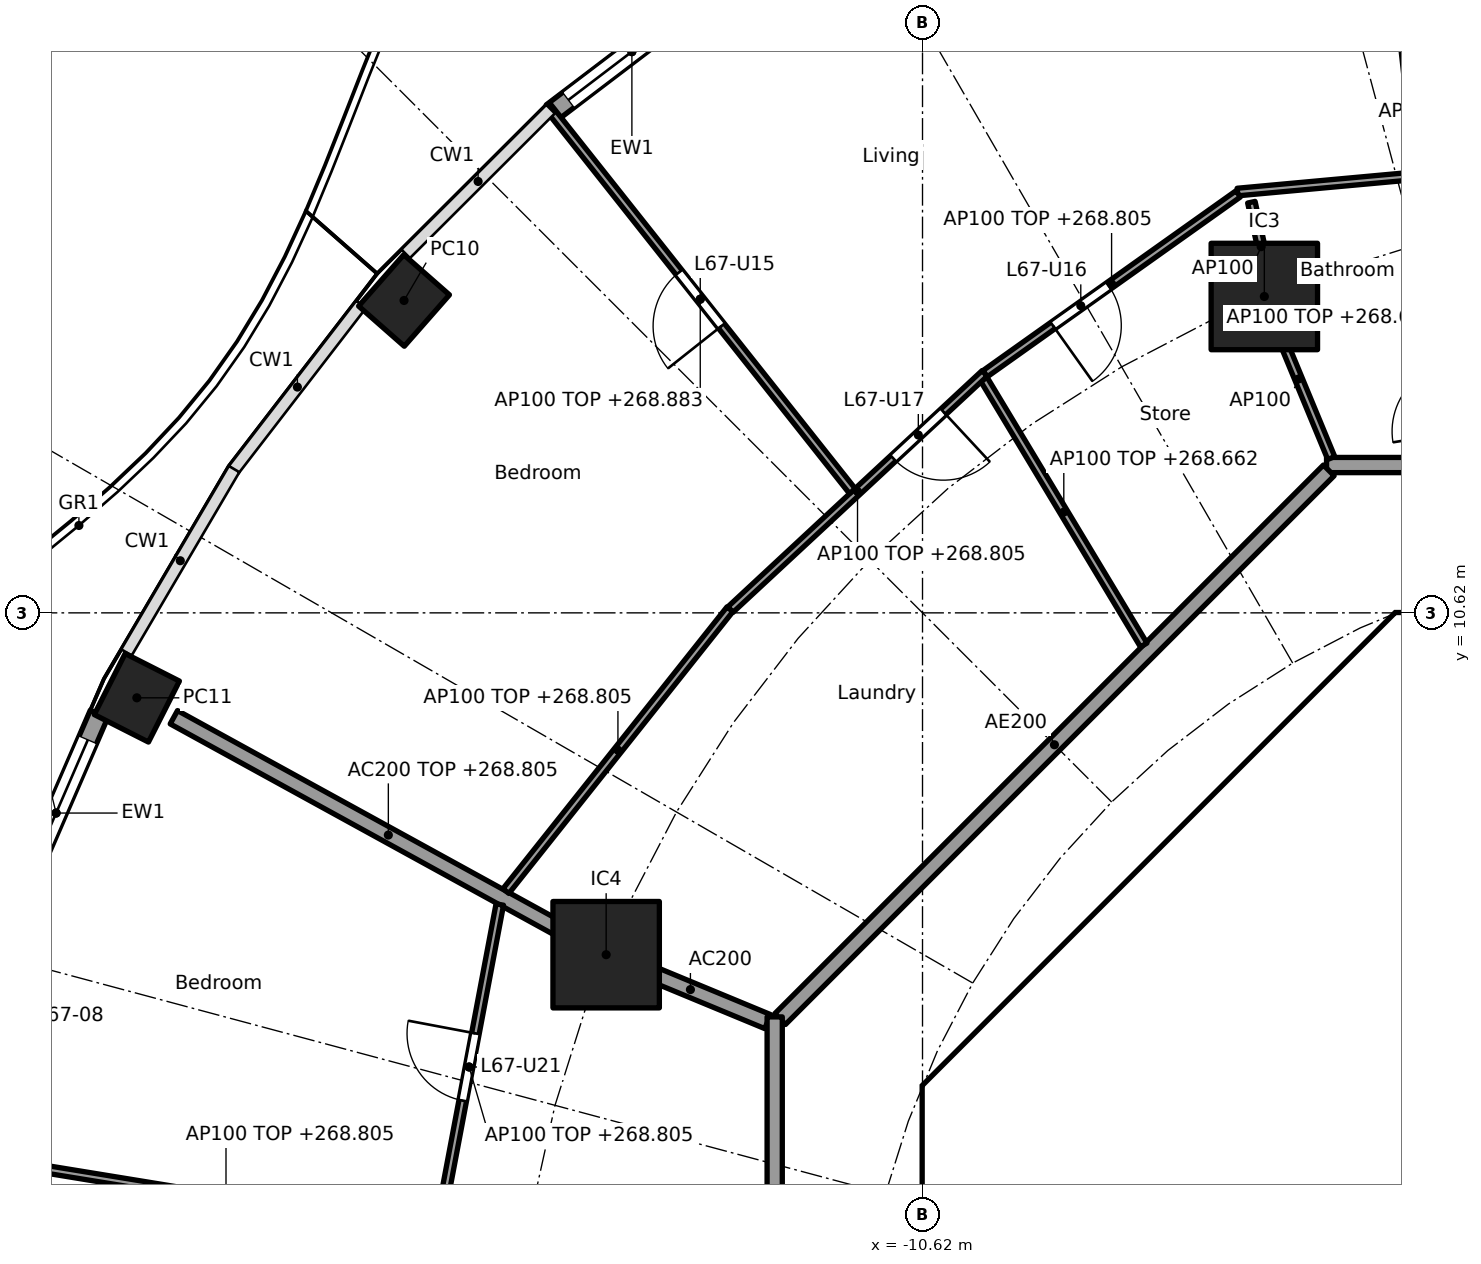
"""IFC4 building model, lengths in metres.
Left out: names, types, materials, properties, quantities, classifications, styles, units other than length and angle.
Written with IfcOpenShell. Run it as: python <this file> out.ifc"""

import sys

from ifc_helpers import new_model, si_unit, direction, frame, frame_2d, origin, origin_2d, place, context, subcontext, project, spatial, polyline, rectangle, hollow_rectangle, outline, extrude, element, fill, save


model = new_model("IFC4")
c1 = context("Model", 3, precision=1e-05, world=origin(), true_north=direction((0.0, 1.0)))
c2 = subcontext(c1, "Body", "Model", "MODEL_VIEW")
j1 = project(units=[si_unit("LENGTHUNIT", "METRE"), si_unit("PLANEANGLEUNIT", "RADIAN")], contexts=[c1])
p1 = place(None, origin())
s1 = spatial("IfcSite", under=j1, at=p1, CompositionType="ELEMENT")
p2 = place(p1, origin())
s2 = spatial("IfcBuilding", under=s1, at=p2, CompositionType="ELEMENT")
p3 = place(p2, frame((0.0, 0.0, 265.9)))
s3 = spatial("IfcBuildingStorey", under=s2, at=p3, CompositionType="ELEMENT", Elevation=265.9)
for number, where, z_axis, x_axis in (
    (1, (-17.441, 14.73, 0.0), (0.0, 0.0, 1.0), (-0.66, -0.751, 0.0)),
    (2, (-20.957, 9.502, 0.0), (0.0, 0.0, 1.0), (-0.452, -0.892, 0.0)),
):
    element("IfcColumn", number, at=place(p3, frame(where, z_axis=z_axis, x_axis=x_axis)), inside=s3, PredefinedType="COLUMN", context=c2, shape_type="SweptSolid", body=[
        extrude(hollow_rectangle(XDim=0.9, YDim=0.8, WallThickness=0.028, at=origin_2d()), origin(), (0.0, 0.0, 1.0), 3.7),
    ])
for number, where, z_axis, x_axis in (
    (3, (-6.123, 14.782, 0.0), (0.0, 0.0, 1.0), (1.0, 0.0, 0.0)),
    (4, (-14.782, 6.123, 0.0), (0.0, 0.0, 1.0), (1.0, 0.0, 0.0)),
):
    element("IfcColumn", number, at=place(p3, frame(where, z_axis=z_axis, x_axis=x_axis)), inside=s3, PredefinedType="COLUMN", context=c2, shape_type="SweptSolid", body=[
        extrude(rectangle(XDim=1.4, YDim=1.4, at=origin_2d()), origin(), (0.0, 0.0, 1.0), 3.7),
    ])
p4 = place(p3, frame((-15.495, 17.204, 0.0), z_axis=(0.0, 0.0, 1.0), x_axis=(0.796010739377, 0.605282498339, 0.0)))
e5 = element("IfcWall", 5, at=p4, inside=s3, PredefinedType="SOLIDWALL", context=c2, shape_type="SweptSolid", body=[
    extrude(rectangle(XDim=2.641, YDim=0.25, at=frame_2d((1.32, 0.0))), origin(), (0.0, 0.0, 1.0), 3.44),
])
p5 = place(p4, frame((0.27, 0.0, 0.0)))
e6 = element("IfcOpeningElement", 6, at=p5, cuts=e5, PredefinedType="OPENING", context=c2, shape_type="SweptSolid", body=[
    extrude(rectangle(XDim=2.1, YDim=2.4, at=frame_2d((1.05, 1.2))), frame((0.0, 0.135, 0.0), z_axis=(0.0, -1.0, 0.0), x_axis=(1.0, 0.0, 0.0)), (0.0, 0.0, 1.0), 0.27),
])
p6 = place(p3, frame((-22.583, 6.683, 0.0), z_axis=(0.0, 0.0, 1.0), x_axis=(0.397597791596, 0.9175598052, 0.0)))
e7 = element("IfcWall", 7, at=p6, inside=s3, PredefinedType="SOLIDWALL", context=c2, shape_type="SweptSolid", body=[
    extrude(rectangle(XDim=2.841, YDim=0.25, at=frame_2d((1.42, 0.0))), origin(), (0.0, 0.0, 1.0), 3.44),
])
p7 = place(p6, frame((0.371, 0.0, 0.0)))
e8 = element("IfcOpeningElement", 8, at=p7, cuts=e7, PredefinedType="OPENING", context=c2, shape_type="SweptSolid", body=[
    extrude(rectangle(XDim=2.1, YDim=2.4, at=frame_2d((1.05, 1.2))), frame((0.0, 0.135, 0.0), z_axis=(0.0, -1.0, 0.0), x_axis=(1.0, 0.0, 0.0)), (0.0, 0.0, 1.0), 0.27),
])
p8 = place(p3, frame((-4.613, 9.988, 0.0), z_axis=(0.0, 0.0, 1.0), x_axis=(-0.707106781187, -0.707106781187, 0.0)))
e9 = element("IfcWall", 9, at=p8, inside=s3, PredefinedType="SHEAR", context=c2, shape_type="SweptSolid", body=[
    extrude(rectangle(XDim=7.602, YDim=0.6, at=frame_2d((3.801, 0.0))), origin(), (0.0, 0.0, 1.0), 3.44),
])
p9 = place(p8, frame((0.351, 0.0, 0.0)))
e10 = element("IfcOpeningElement", 10, at=p9, cuts=e9, PredefinedType="OPENING", context=c2, shape_type="SweptSolid", body=[
    extrude(rectangle(XDim=1.1, YDim=2.1, at=frame_2d((0.55, 1.05))), frame((0.0, 0.31, 0.0), z_axis=(0.0, -1.0, 0.0), x_axis=(1.0, 0.0, 0.0)), (0.0, 0.0, 1.0), 0.62),
])
p10 = place(p3, frame((-10.325, 3.801, 0.0), z_axis=(0.0, 0.0, 1.0), x_axis=(0.0, -1.0, 0.0)))
e11 = element("IfcWall", 11, at=p10, inside=s3, PredefinedType="SHEAR", context=c2, shape_type="SweptSolid", body=[
    extrude(rectangle(XDim=7.602, YDim=0.6, at=frame_2d((3.801, 0.0))), origin(), (0.0, 0.0, 1.0), 3.44),
])
p11 = place(p10, frame((0.651, 0.0, 0.0)))
e12 = element("IfcOpeningElement", 12, at=p11, cuts=e11, PredefinedType="OPENING", context=c2, shape_type="SweptSolid", body=[
    extrude(rectangle(XDim=1.5, YDim=2.1, at=frame_2d((0.75, 1.05))), frame((0.0, 0.31, 0.0), z_axis=(0.0, -1.0, 0.0), x_axis=(1.0, 0.0, 0.0)), (0.0, 0.0, 1.0), 0.62),
])
p12 = place(p10, frame((5.451, 0.0, 0.0)))
e13 = element("IfcOpeningElement", 13, at=p12, cuts=e11, PredefinedType="OPENING", context=c2, shape_type="SweptSolid", body=[
    extrude(rectangle(XDim=1.5, YDim=2.1, at=frame_2d((0.75, 1.05))), frame((0.0, 0.31, 0.0), z_axis=(0.0, -1.0, 0.0), x_axis=(1.0, 0.0, 0.0)), (0.0, 0.0, 1.0), 0.62),
])
p13 = place(p3, frame((-5.8, 4.3, 0.0), z_axis=(0.0, 0.0, 1.0), x_axis=(0.0, 1.0, 0.0)))
e14 = element("IfcWall", 14, at=p13, inside=s3, PredefinedType="PARTITIONING", context=c2, shape_type="SweptSolid", body=[
    extrude(rectangle(XDim=3.927, YDim=0.15, at=frame_2d((1.963, 0.0))), origin(), (0.0, 0.0, 1.0), 3.44),
])
p14 = place(p13, frame((0.262, 0.0, 0.0)))
e15 = element("IfcOpeningElement", 15, at=p14, cuts=e14, PredefinedType="OPENING", context=c2, shape_type="SweptSolid", body=[
    extrude(rectangle(XDim=0.9, YDim=2.1, at=frame_2d((0.45, 1.05))), frame((0.0, 0.085, 0.0), z_axis=(0.0, -1.0, 0.0), x_axis=(1.0, 0.0, 0.0)), (0.0, 0.0, 1.0), 0.17),
])
p15 = place(p13, frame((2.338, 0.0, 0.0)))
e16 = element("IfcOpeningElement", 16, at=p15, cuts=e14, PredefinedType="OPENING", context=c2, shape_type="SweptSolid", body=[
    extrude(rectangle(XDim=0.9, YDim=2.1, at=frame_2d((0.45, 1.05))), frame((0.0, 0.085, 0.0), z_axis=(0.0, -1.0, 0.0), x_axis=(1.0, 0.0, 0.0)), (0.0, 0.0, 1.0), 0.17),
])
p16 = place(p3, origin())
e17 = element("IfcWall", 17, at=p16, inside=s3, PredefinedType="SHEAR", context=c2, shape_type="SweptSolid", body=[
    extrude(outline(polyline([(-10.2, 4.825), (-9.776, 4.401), (-10.025, 4.152), (-10.025, 3.801), (-10.625, 3.801), (-10.625, 4.401), (-10.2, 4.825)])), origin(), (0.0, 0.0, 1.0), 3.44),
])
p17 = place(p3, origin())
e18 = element("IfcWall", 18, at=p17, inside=s3, PredefinedType="SHEAR", context=c2, shape_type="SweptSolid", body=[
    extrude(outline(polyline([(-4.152, 10.025), (-4.401, 9.776), (-4.825, 10.2), (-4.401, 10.625), (4.401, 10.625), (4.825, 10.2), (4.401, 9.776), (4.152, 10.025), (-4.152, 10.025)])), origin(), (0.0, 0.0, 1.0), 3.44),
])
p18 = place(p3, frame((-10.025, 4.0, 0.0), z_axis=(0.0, 0.0, 1.0), x_axis=(1.0, 0.0, 0.0)))
e19 = element("IfcWall", 19, at=p18, inside=s3, PredefinedType="PARTITIONING", context=c2, shape_type="SweptSolid", body=[
    extrude(rectangle(XDim=3.325, YDim=0.2, at=frame_2d((1.662, 0.0))), origin(), (0.0, 0.0, 1.0), 3.44),
])
p19 = place(p3, frame((-8.301, 5.8, 0.0), z_axis=(0.0, 0.0, 1.0), x_axis=(1.0, 0.0, 0.0)))
e20 = element("IfcWall", 20, at=p19, inside=s3, PredefinedType="PARTITIONING", context=c2, shape_type="SweptSolid", body=[
    extrude(rectangle(XDim=2.426, YDim=0.15, at=frame_2d((1.213, 0.0))), origin(), (0.0, 0.0, 1.0), 3.44),
])
p20 = place(p3, origin())
e21 = element("IfcWall", 21, at=p20, inside=s3, PredefinedType="SOLIDWALL", context=c2, shape_type="SweptSolid", body=[
    extrude(outline(polyline([(-6.7, 4.3), (6.7, 4.3), (6.7, 2.1), (6.5, 2.1), (6.5, 4.1), (4.5, 4.1), (4.5, 2.1), (4.3, 2.1), (4.3, 4.1), (2.3, 4.1), (2.3, 2.1), (2.1, 2.1), (2.1, 4.1), (0.1, 4.1), (0.1, 2.1), (-0.1, 2.1), (-0.1, 4.1), (-4.3, 4.1), (-4.3, 2.1), (-4.5, 2.1), (-4.5, 4.1), (-6.5, 4.1), (-6.5, 2.1), (-6.7, 2.1), (-6.7, 4.3)])), origin(), (0.0, 0.0, 1.0), 3.44),
])
p21 = place(p3, frame((-12.657, 5.243, 0.0), z_axis=(0.0, 0.0, 1.0), x_axis=(-0.923869415315, 0.382707856524, 0.0)))
e22 = element("IfcWall", 22, at=p21, inside=s3, PredefinedType="PARTITIONING", context=c2, shape_type="SweptSolid", body=[
    extrude(rectangle(XDim=2.2, YDim=0.2, at=frame_2d((1.1, 0.0))), origin(), (0.0, 0.0, 1.0), 3.44),
])
p22 = place(p3, frame((-14.826, 6.147, 0.0), z_axis=(0.0, 0.0, 1.0), x_axis=(-0.876484755865, 0.481429613481, 0.0)))
e23 = element("IfcWall", 23, at=p22, inside=s3, PredefinedType="PARTITIONING", context=c2, shape_type="SweptSolid", body=[
    extrude(rectangle(XDim=6.439, YDim=0.2, at=frame_2d((3.219, 0.0))), origin(), (0.0, 0.0, 1.0), 2.905),
])
p23 = place(p3, frame((5.104, 12.565, 0.0), z_axis=(0.0, 0.0, 1.0), x_axis=(-1.0, 0.0, 0.0)))
e24 = element("IfcWall", 24, at=p23, inside=s3, PredefinedType="PARTITIONING", context=c2, shape_type="SweptSolid", body=[
    extrude(rectangle(XDim=10.409, YDim=0.2, at=frame_2d((5.205, 0.0))), origin(), (0.0, 0.0, 1.0), 3.44),
])
p24 = place(p23, frame((6.339, 0.0, 0.0)))
e25 = element("IfcOpeningElement", 25, at=p24, cuts=e24, PredefinedType="OPENING", context=c2, shape_type="SweptSolid", body=[
    extrude(rectangle(XDim=1.0, YDim=2.1, at=frame_2d((0.5, 1.05))), frame((0.0, 0.11, 0.0), z_axis=(0.0, -1.0, 0.0), x_axis=(1.0, 0.0, 0.0)), (0.0, 0.0, 1.0), 0.22),
])
p25 = place(p3, frame((-5.275, 12.494, 0.0), z_axis=(0.0, 0.0, 1.0), x_axis=(-0.707106781187, -0.707106781187, 0.0)))
e26 = element("IfcWall", 26, at=p25, inside=s3, PredefinedType="PARTITIONING", context=c2, shape_type="SweptSolid", body=[
    extrude(rectangle(XDim=10.209, YDim=0.2, at=frame_2d((5.104, 0.0))), origin(), (0.0, 0.0, 1.0), 3.44),
])
p26 = place(p3, frame((-12.565, 5.304, 0.0), z_axis=(0.0, 0.0, 1.0), x_axis=(0.0, -1.0, 0.0)))
e27 = element("IfcWall", 27, at=p26, inside=s3, PredefinedType="PARTITIONING", context=c2, shape_type="SweptSolid", body=[
    extrude(rectangle(XDim=10.409, YDim=0.2, at=frame_2d((5.205, 0.0))), origin(), (0.0, 0.0, 1.0), 3.44),
])
p27 = place(p26, frame((6.539, 0.0, 0.0)))
e28 = element("IfcOpeningElement", 28, at=p27, cuts=e27, PredefinedType="OPENING", context=c2, shape_type="SweptSolid", body=[
    extrude(rectangle(XDim=1.0, YDim=2.1, at=frame_2d((0.5, 1.05))), frame((0.0, 0.11, 0.0), z_axis=(0.0, -1.0, 0.0), x_axis=(1.0, 0.0, 0.0)), (0.0, 0.0, 1.0), 0.22),
])
p28 = place(p3, frame((-1.711, 16.592, 0.0), z_axis=(0.0, 0.0, 1.0), x_axis=(-0.995843707015, -0.091078599017, 0.0)))
e29 = element("IfcWall", 29, at=p28, inside=s3, PredefinedType="PARTITIONING", context=c2, shape_type="SweptSolid", body=[
    extrude(rectangle(XDim=4.785, YDim=0.1, at=frame_2d((2.392, 0.0))), origin(), (0.0, 0.0, 1.0), 2.905),
])
p29 = place(p3, frame((-4.099, 16.424, 0.0), z_axis=(0.0, 0.0, 1.0), x_axis=(-0.10867295252, 0.99407755703, 0.0)))
e30 = element("IfcWall", 30, at=p29, inside=s3, PredefinedType="PARTITIONING", context=c2, shape_type="SweptSolid", body=[
    extrude(rectangle(XDim=5.974, YDim=0.1, at=frame_2d((2.987, 0.0))), origin(), (0.0, 0.0, 1.0), 2.983),
])
p30 = place(p29, frame((2.537, 0.0, 0.0)))
e31 = element("IfcOpeningElement", 31, at=p30, cuts=e30, PredefinedType="OPENING", context=c2, shape_type="SweptSolid", body=[
    extrude(rectangle(XDim=0.9, YDim=2.1, at=frame_2d((0.45, 1.05))), frame((0.0, 0.06, 0.0), z_axis=(0.0, -1.0, 0.0), x_axis=(1.0, 0.0, 0.0)), (0.0, 0.0, 1.0), 0.12),
])
p31 = place(p3, frame((-5.243, 12.657, 0.0), z_axis=(0.0, 0.0, 1.0), x_axis=(-0.382719158442, 0.923864733477, 0.0)))
e32 = element("IfcWall", 32, at=p31, inside=s3, PredefinedType="PARTITIONING", context=c2, shape_type="SweptSolid", body=[
    extrude(rectangle(XDim=2.25, YDim=0.1, at=frame_2d((1.125, 0.0))), origin(), (0.0, 0.0, 1.0), 3.44),
])
p32 = place(p3, frame((-6.467, 16.132, 0.0), z_axis=(0.0, 0.0, 1.0), x_axis=(-0.815192286069, -0.579190414919, 0.0)))
e33 = element("IfcWall", 33, at=p32, inside=s3, PredefinedType="PARTITIONING", context=c2, shape_type="SweptSolid", body=[
    extrude(rectangle(XDim=4.086, YDim=0.1, at=frame_2d((2.043, 0.0))), origin(), (0.0, 0.0, 1.0), 2.905),
])
p33 = place(p32, frame((2.09, 0.0, 0.0)))
e34 = element("IfcOpeningElement", 34, at=p33, cuts=e33, PredefinedType="OPENING", context=c2, shape_type="SweptSolid", body=[
    extrude(rectangle(XDim=0.9, YDim=2.1, at=frame_2d((0.45, 1.05))), frame((0.0, 0.06, 0.0), z_axis=(0.0, -1.0, 0.0), x_axis=(1.0, 0.0, 0.0)), (0.0, 0.0, 1.0), 0.12),
])
p34 = place(p3, frame((-7.709, 10.197, 0.0), z_axis=(0.0, 0.0, 1.0), x_axis=(-0.515524871668, 0.856874615502, 0.0)))
e35 = element("IfcWall", 35, at=p34, inside=s3, PredefinedType="PARTITIONING", context=c2, shape_type="SweptSolid", body=[
    extrude(rectangle(XDim=4.08, YDim=0.1, at=frame_2d((2.04, 0.0))), origin(), (0.0, 0.0, 1.0), 2.762),
])
p35 = place(p3, frame((-9.802, 13.77, 0.0), z_axis=(0.0, 0.0, 1.0), x_axis=(-0.732662099478, -0.680592571212, 0.0)))
e36 = element("IfcWall", 36, at=p35, inside=s3, PredefinedType="PARTITIONING", context=c2, shape_type="SweptSolid", body=[
    extrude(rectangle(XDim=4.567, YDim=0.1, at=frame_2d((2.283, 0.0))), origin(), (0.0, 0.0, 1.0), 2.905),
])
p36 = place(p35, frame((0.742, 0.0, 0.0)))
e37 = element("IfcOpeningElement", 37, at=p36, cuts=e36, PredefinedType="OPENING", context=c2, shape_type="SweptSolid", body=[
    extrude(rectangle(XDim=0.9, YDim=2.1, at=frame_2d((0.45, 1.05))), frame((0.0, 0.06, 0.0), z_axis=(0.0, -1.0, 0.0), x_axis=(1.0, 0.0, 0.0)), (0.0, 0.0, 1.0), 0.12),
])
p37 = place(p3, frame((-11.543, 12.221, 0.0), z_axis=(0.0, 0.0, 1.0), x_axis=(-0.621117202271, 0.783717692185, 0.0)))
e38 = element("IfcWall", 38, at=p37, inside=s3, PredefinedType="PARTITIONING", context=c2, shape_type="SweptSolid", body=[
    extrude(rectangle(XDim=6.444, YDim=0.1, at=frame_2d((3.222, 0.0))), origin(), (0.0, 0.0, 1.0), 2.983),
])
p38 = place(p37, frame((2.772, 0.0, 0.0)))
e39 = element("IfcOpeningElement", 39, at=p38, cuts=e38, PredefinedType="OPENING", context=c2, shape_type="SweptSolid", body=[
    extrude(rectangle(XDim=0.9, YDim=2.1, at=frame_2d((0.45, 1.05))), frame((0.0, 0.06, 0.0), z_axis=(0.0, -1.0, 0.0), x_axis=(1.0, 0.0, 0.0)), (0.0, 0.0, 1.0), 0.12),
])
p39 = place(p3, frame((-13.154, 10.667, 0.0), z_axis=(0.0, 0.0, 1.0), x_axis=(-0.622246555556, -0.782821323227, 0.0)))
e40 = element("IfcWall", 40, at=p39, inside=s3, PredefinedType="PARTITIONING", context=c2, shape_type="SweptSolid", body=[
    extrude(rectangle(XDim=4.736, YDim=0.1, at=frame_2d((2.368, 0.0))), origin(), (0.0, 0.0, 1.0), 2.905),
])
p40 = place(p3, frame((-16.181, 6.783, 0.0), z_axis=(0.0, 0.0, 1.0), x_axis=(-0.185670583745, -0.982612046706, 0.0)))
e41 = element("IfcWall", 41, at=p40, inside=s3, PredefinedType="PARTITIONING", context=c2, shape_type="SweptSolid", body=[
    extrude(rectangle(XDim=4.351, YDim=0.1, at=frame_2d((2.176, 0.0))), origin(), (0.0, 0.0, 1.0), 2.905),
])
p41 = place(p40, frame((1.726, 0.0, 0.0)))
e42 = element("IfcOpeningElement", 42, at=p41, cuts=e41, PredefinedType="OPENING", context=c2, shape_type="SweptSolid", body=[
    extrude(rectangle(XDim=0.9, YDim=2.1, at=frame_2d((0.45, 1.05))), frame((0.0, 0.06, 0.0), z_axis=(0.0, -1.0, 0.0), x_axis=(1.0, 0.0, 0.0)), (0.0, 0.0, 1.0), 0.12),
])
p42 = place(p3, frame((-16.949, 2.451, 0.0), z_axis=(0.0, 0.0, 1.0), x_axis=(-0.986937570833, 0.161103169673, 0.0)))
e43 = element("IfcWall", 43, at=p42, inside=s3, PredefinedType="PARTITIONING", context=c2, shape_type="SweptSolid", body=[
    extrude(rectangle(XDim=5.743, YDim=0.1, at=frame_2d((2.872, 0.0))), origin(), (0.0, 0.0, 1.0), 2.905),
])
p43 = place(p3, frame((-6.036, 14.853, 0.0), z_axis=(0.0, 0.0, 1.0), x_axis=(-0.215009518078, 0.976611953202, 0.0)))
e44 = element("IfcWall", 44, at=p43, inside=s3, PredefinedType="PARTITIONING", context=c2, shape_type="SweptSolid", body=[
    extrude(rectangle(XDim=1.198, YDim=0.1, at=frame_2d((0.599, 0.0))), origin(), (0.0, 0.0, 1.0), 3.44),
])
p44 = place(p5, origin())
e45 = element("IfcDoor", 45, at=p44, inside=s3, OperationType="SLIDING_TO_LEFT", PredefinedType="DOOR", context=c2, shape_type="SweptSolid", body=[
    extrude(rectangle(XDim=2.1, YDim=2.4, at=frame_2d((1.05, 1.2))), frame((0.0, 0.025, 0.0), z_axis=(0.0, -1.0, 0.0), x_axis=(1.0, 0.0, 0.0)), (0.0, 0.0, 1.0), 0.05),
])
fill(e6, e45)
p45 = place(p7, origin())
e46 = element("IfcDoor", 46, at=p45, inside=s3, OperationType="SLIDING_TO_LEFT", PredefinedType="DOOR", context=c2, shape_type="SweptSolid", body=[
    extrude(rectangle(XDim=2.1, YDim=2.4, at=frame_2d((1.05, 1.2))), frame((0.0, 0.025, 0.0), z_axis=(0.0, -1.0, 0.0), x_axis=(1.0, 0.0, 0.0)), (0.0, 0.0, 1.0), 0.05),
])
fill(e8, e46)
p46 = place(p14, origin())
e47 = element("IfcDoor", 47, at=p46, inside=s3, OperationType="SINGLE_SWING_RIGHT", PredefinedType="DOOR", context=c2, shape_type="SweptSolid", body=[
    extrude(rectangle(XDim=0.9, YDim=2.1, at=frame_2d((0.45, 1.05))), frame((0.0, 0.025, 0.0), z_axis=(0.0, -1.0, 0.0), x_axis=(1.0, 0.0, 0.0)), (0.0, 0.0, 1.0), 0.05),
])
fill(e15, e47)
p47 = place(p15, origin())
e48 = element("IfcDoor", 48, at=p47, inside=s3, OperationType="SINGLE_SWING_RIGHT", PredefinedType="DOOR", context=c2, shape_type="SweptSolid", body=[
    extrude(rectangle(XDim=0.9, YDim=2.1, at=frame_2d((0.45, 1.05))), frame((0.0, 0.025, 0.0), z_axis=(0.0, -1.0, 0.0), x_axis=(1.0, 0.0, 0.0)), (0.0, 0.0, 1.0), 0.05),
])
fill(e16, e48)
p48 = place(p11, origin())
e49 = element("IfcDoor", 49, at=p48, inside=s3, OperationType="DOUBLE_DOOR_SINGLE_SWING", PredefinedType="DOOR", context=c2, shape_type="SweptSolid", body=[
    extrude(rectangle(XDim=1.5, YDim=2.1, at=frame_2d((0.75, 1.05))), frame((0.0, 0.025, 0.0), z_axis=(0.0, -1.0, 0.0), x_axis=(1.0, 0.0, 0.0)), (0.0, 0.0, 1.0), 0.05),
])
fill(e12, e49)
p49 = place(p9, origin())
e50 = element("IfcDoor", 50, at=p49, inside=s3, OperationType="SINGLE_SWING_RIGHT", PredefinedType="DOOR", context=c2, shape_type="SweptSolid", body=[
    extrude(rectangle(XDim=1.1, YDim=2.1, at=frame_2d((0.55, 1.05))), frame((0.0, 0.025, 0.0), z_axis=(0.0, -1.0, 0.0), x_axis=(1.0, 0.0, 0.0)), (0.0, 0.0, 1.0), 0.05),
])
fill(e10, e50)
p50 = place(p38, origin())
e51 = element("IfcDoor", 51, at=p50, inside=s3, OperationType="SINGLE_SWING_LEFT", PredefinedType="DOOR", context=c2, shape_type="SweptSolid", body=[
    extrude(rectangle(XDim=0.9, YDim=2.1, at=frame_2d((0.45, 1.05))), frame((0.0, 0.025, 0.0), z_axis=(0.0, -1.0, 0.0), x_axis=(1.0, 0.0, 0.0)), (0.0, 0.0, 1.0), 0.05),
])
fill(e39, e51)
p51 = place(p33, origin())
e52 = element("IfcDoor", 52, at=p51, inside=s3, OperationType="SINGLE_SWING_RIGHT", PredefinedType="DOOR", context=c2, shape_type="SweptSolid", body=[
    extrude(rectangle(XDim=0.9, YDim=2.1, at=frame_2d((0.45, 1.05))), frame((0.0, 0.025, 0.0), z_axis=(0.0, -1.0, 0.0), x_axis=(1.0, 0.0, 0.0)), (0.0, 0.0, 1.0), 0.05),
])
fill(e34, e52)
p52 = place(p36, origin())
e53 = element("IfcDoor", 53, at=p52, inside=s3, OperationType="SINGLE_SWING_LEFT", PredefinedType="DOOR", context=c2, shape_type="SweptSolid", body=[
    extrude(rectangle(XDim=0.9, YDim=2.1, at=frame_2d((0.45, 1.05))), frame((0.0, 0.025, 0.0), z_axis=(0.0, -1.0, 0.0), x_axis=(1.0, 0.0, 0.0)), (0.0, 0.0, 1.0), 0.05),
])
fill(e37, e53)
p53 = place(p41, frame((0.9, 0.0, 0.0), x_axis=(-1.0, 0.0, 0.0)))
e54 = element("IfcDoor", 54, at=p53, inside=s3, OperationType="SINGLE_SWING_RIGHT", PredefinedType="DOOR", context=c2, shape_type="SweptSolid", body=[
    extrude(rectangle(XDim=0.9, YDim=2.1, at=frame_2d((0.45, 1.05))), frame((0.0, 0.025, 0.0), z_axis=(0.0, -1.0, 0.0), x_axis=(1.0, 0.0, 0.0)), (0.0, 0.0, 1.0), 0.05),
])
fill(e42, e54)
save(model, sys.argv[1])
